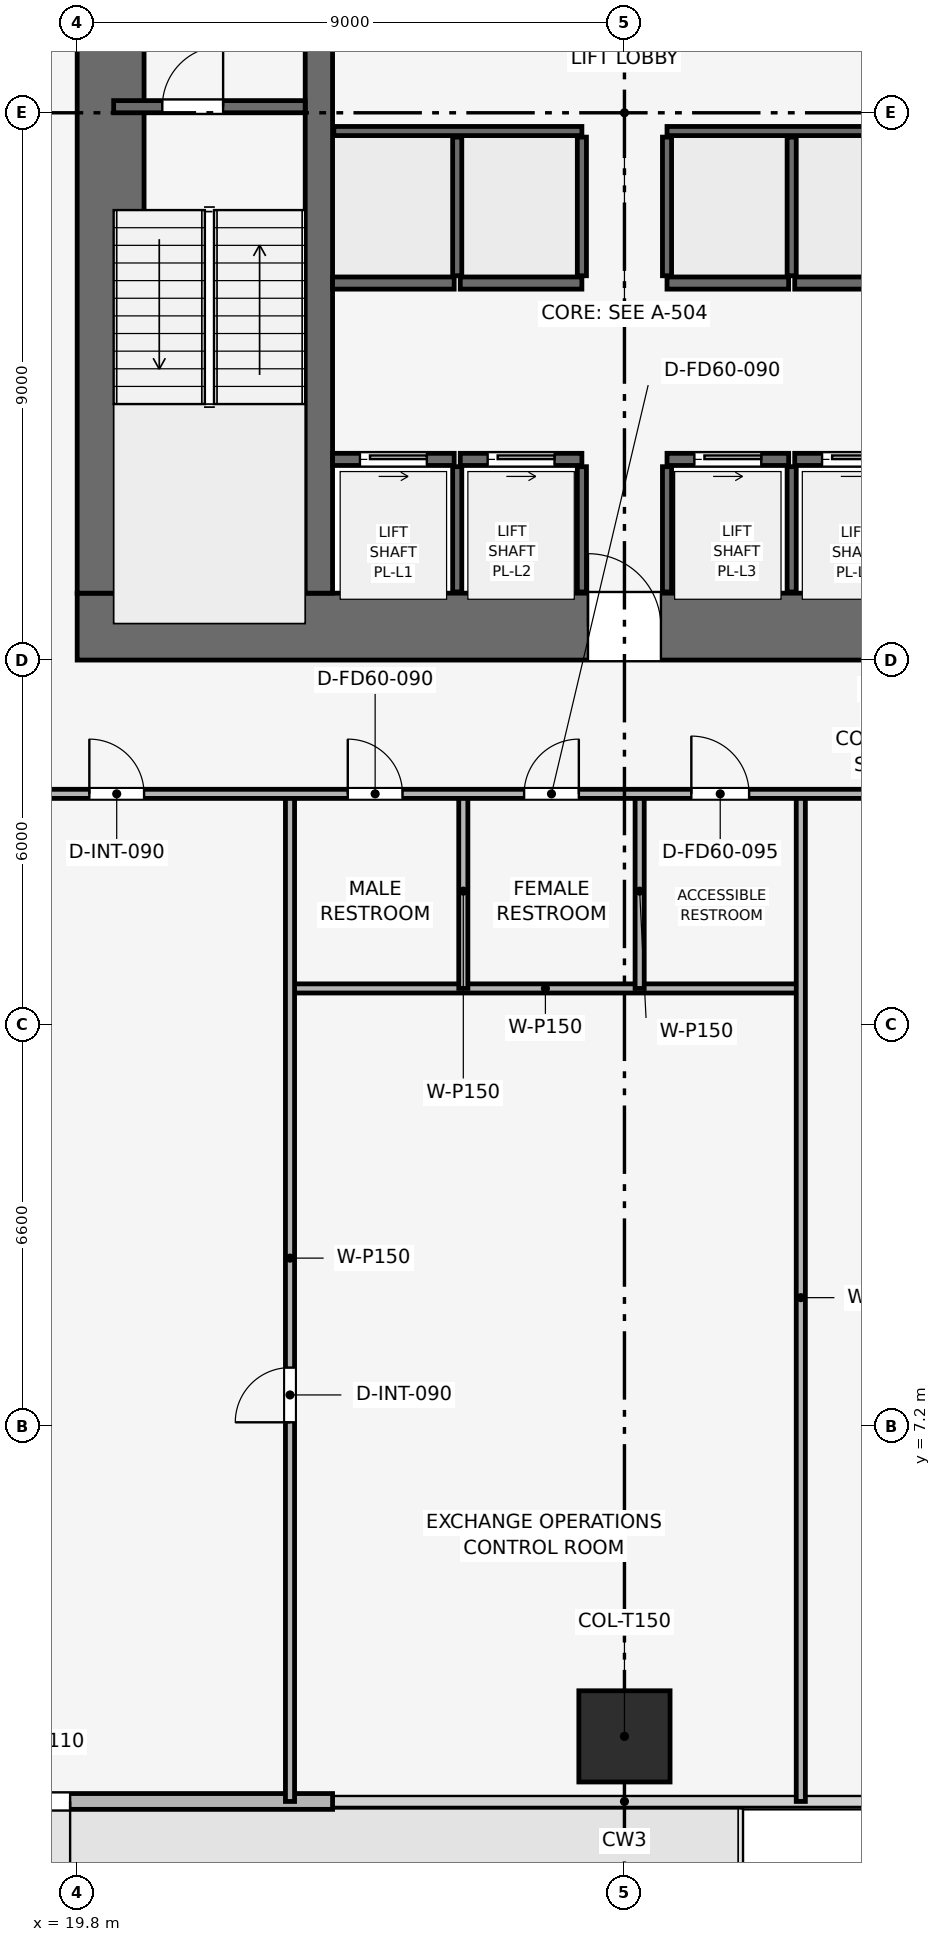
"""IFC4 building model, lengths in metres.
Left out: names, types, materials, properties, quantities, classifications, styles, units other than length and angle.
Written with IfcOpenShell. Run it as: python <this file> out.ifc"""

import sys

from ifc_helpers import new_model, si_unit, direction, frame, frame_2d, origin, origin_2d, place, context, subcontext, project, spatial, rectangle, extrude, element, fill, save


model = new_model("IFC4")
c1 = context("Model", 3, precision=1e-05, world=origin(), true_north=direction((0.0, 1.0)))
c2 = subcontext(c1, "Body", "Model", "MODEL_VIEW")
j1 = project(units=[si_unit("LENGTHUNIT", "METRE"), si_unit("PLANEANGLEUNIT", "RADIAN")], contexts=[c1])
p1 = place(None, origin())
s1 = spatial("IfcSite", under=j1, at=p1, CompositionType="ELEMENT")
p2 = place(p1, origin())
s2 = spatial("IfcBuilding", under=s1, at=p2, CompositionType="ELEMENT")
p3 = place(p2, frame((0.0, 0.0, 53.4)))
s3 = spatial("IfcBuildingStorey", under=s2, at=p3, CompositionType="ELEMENT", Elevation=53.4)
p4 = place(p3, frame((19.8, 20.35, 0.0), z_axis=(0.0, 0.0, 1.0), x_axis=(1.0, 0.0, 0.0)))
e1 = element("IfcWall", 1, at=p4, inside=s3, PredefinedType="SHEAR", context=c2, shape_type="SweptSolid", body=[
    extrude(rectangle(XDim=18.0, YDim=1.1, at=frame_2d((9.0, 0.0))), origin(), (0.0, 0.0, 1.0), 3.9),
])
p5 = place(p4, frame((8.4, 0.0, 0.0)))
e2 = element("IfcOpeningElement", 2, at=p5, cuts=e1, PredefinedType="OPENING", context=c2, shape_type="SweptSolid", body=[
    extrude(rectangle(XDim=1.2, YDim=2.2, at=frame_2d((0.6, 1.1))), frame((0.0, 0.56, 0.0), z_axis=(0.0, -1.0, 0.0), x_axis=(1.0, 0.0, 0.0)), (0.0, 0.0, 1.0), 1.12),
])
p6 = place(p3, frame((20.35, 20.9, 0.0), z_axis=(0.0, 0.0, 1.0), x_axis=(0.0, 1.0, 0.0)))
e3 = element("IfcWall", 3, at=p6, inside=s3, PredefinedType="SHEAR", context=c2, shape_type="SweptSolid", body=[
    extrude(rectangle(XDim=15.8, YDim=1.1, at=frame_2d((7.9, 0.0))), origin(), (0.0, 0.0, 1.0), 3.9),
])
p7 = place(p6, frame((9.9, 0.0, 0.0)))
e4 = element("IfcOpeningElement", 4, at=p7, cuts=e3, PredefinedType="OPENING", context=c2, shape_type="SweptSolid", body=[
    extrude(rectangle(XDim=1.1, YDim=2.15, at=frame_2d((0.55, 1.075))), frame((0.0, 0.56, 0.0), z_axis=(0.0, -1.0, 0.0), x_axis=(1.0, 0.0, 0.0)), (0.0, 0.0, 1.0), 1.12),
])
p8 = place(p3, frame((23.775, 20.9, 0.0), z_axis=(0.0, 0.0, 1.0), x_axis=(0.0, 1.0, 0.0)))
e5 = element("IfcWall", 5, at=p8, inside=s3, PredefinedType="SHEAR", context=c2, shape_type="SweptSolid", body=[
    extrude(rectangle(XDim=15.8, YDim=0.45, at=frame_2d((7.9, 0.0))), origin(), (0.0, 0.0, 1.0), 3.9),
])
p9 = place(p3, frame((28.8, 2.1, 0.003), z_axis=(0.0, 0.0, 1.0), x_axis=(1.0, 0.0, 0.0)))
e6 = element("IfcColumn", 6, at=p9, inside=s3, PredefinedType="COLUMN", context=c2, shape_type="SweptSolid", body=[
    extrude(rectangle(XDim=1.5, YDim=1.5, at=origin_2d()), origin(), (0.0, 0.0, 1.0), 3.644),
])
p10 = place(p3, frame((24.0, 1.03, 0.0), z_axis=(0.0, 0.0, 1.0), x_axis=(-1.0, 0.0, 0.0)))
e7 = element("IfcWall", 7, at=p10, inside=s3, PredefinedType="SOLIDWALL", context=c2, shape_type="SweptSolid", body=[
    extrude(rectangle(XDim=15.3, YDim=0.26, at=frame_2d((7.65, 0.0))), origin(), (0.0, 0.0, 1.0), 3.65),
])
p11 = place(p10, frame((4.316, 0.0, 0.0)))
e8 = element("IfcOpeningElement", 8, at=p11, cuts=e7, PredefinedType="OPENING", context=c2, shape_type="SweptSolid", body=[
    extrude(rectangle(XDim=1.1, YDim=2.2, at=frame_2d((0.55, 1.1))), frame((0.0, 0.14, 0.0), z_axis=(0.0, -1.0, 0.0), x_axis=(1.0, 0.0, 0.0)), (0.0, 0.0, 1.0), 0.28),
])
p12 = place(p3, frame((20.4, 28.9, 0.0), z_axis=(0.0, 0.0, 1.0), x_axis=(1.0, 0.0, 0.0)))
e9 = element("IfcWall", 9, at=p12, inside=s3, PredefinedType="SHEAR", context=c2, shape_type="SweptSolid", body=[
    extrude(rectangle(XDim=3.15, YDim=0.2, at=frame_2d((1.575, 0.0))), origin(), (0.0, 0.0, 1.0), 3.65),
])
p13 = place(p12, frame((0.8, 0.0, 0.0)))
e10 = element("IfcOpeningElement", 10, at=p13, cuts=e9, PredefinedType="OPENING", context=c2, shape_type="SweptSolid", body=[
    extrude(rectangle(XDim=1.0, YDim=2.1, at=frame_2d((0.5, 1.05))), frame((0.0, 0.11, 0.0), z_axis=(0.0, -1.0, 0.0), x_axis=(1.0, 0.0, 0.0)), (0.0, 0.0, 1.0), 0.22),
])
p14 = place(p3, frame((24.0, 23.1, 0.0), z_axis=(0.0, 0.0, 1.0), x_axis=(1.0, 0.0, 0.0)))
e11 = element("IfcWall", 11, at=p14, inside=s3, PredefinedType="SHEAR", context=c2, shape_type="SweptSolid", body=[
    extrude(rectangle(XDim=2.0, YDim=0.2, at=frame_2d((1.0, 0.0))), origin(), (0.0, 0.0, 1.0), 3.65),
])
p15 = place(p14, frame((0.45, 0.0, 0.0)))
e12 = element("IfcOpeningElement", 12, at=p15, cuts=e11, PredefinedType="OPENING", context=c2, shape_type="SweptSolid", body=[
    extrude(rectangle(XDim=1.1, YDim=2.15, at=frame_2d((0.55, 1.075))), frame((0.0, 0.11, 0.0), z_axis=(0.0, -1.0, 0.0), x_axis=(1.0, 0.0, 0.0)), (0.0, 0.0, 1.0), 0.22),
])
p16 = place(p3, frame((26.1, 23.1, 0.0), z_axis=(0.0, 0.0, 1.0), x_axis=(1.0, 0.0, 0.0)))
e13 = element("IfcWall", 13, at=p16, inside=s3, PredefinedType="SHEAR", context=c2, shape_type="SweptSolid", body=[
    extrude(rectangle(XDim=2.0, YDim=0.2, at=frame_2d((1.0, 0.0))), origin(), (0.0, 0.0, 1.0), 3.65),
])
p17 = place(p16, frame((0.45, 0.0, 0.0)))
e14 = element("IfcOpeningElement", 14, at=p17, cuts=e13, PredefinedType="OPENING", context=c2, shape_type="SweptSolid", body=[
    extrude(rectangle(XDim=1.1, YDim=2.15, at=frame_2d((0.55, 1.075))), frame((0.0, 0.11, 0.0), z_axis=(0.0, -1.0, 0.0), x_axis=(1.0, 0.0, 0.0)), (0.0, 0.0, 1.0), 0.22),
])
p18 = place(p3, frame((29.5, 23.1, 0.0), z_axis=(0.0, 0.0, 1.0), x_axis=(1.0, 0.0, 0.0)))
e15 = element("IfcWall", 15, at=p18, inside=s3, PredefinedType="SHEAR", context=c2, shape_type="SweptSolid", body=[
    extrude(rectangle(XDim=2.0, YDim=0.2, at=frame_2d((1.0, 0.0))), origin(), (0.0, 0.0, 1.0), 3.65),
])
p19 = place(p18, frame((0.45, 0.0, 0.0)))
e16 = element("IfcOpeningElement", 16, at=p19, cuts=e15, PredefinedType="OPENING", context=c2, shape_type="SweptSolid", body=[
    extrude(rectangle(XDim=1.1, YDim=2.15, at=frame_2d((0.55, 1.075))), frame((0.0, 0.11, 0.0), z_axis=(0.0, -1.0, 0.0), x_axis=(1.0, 0.0, 0.0)), (0.0, 0.0, 1.0), 0.22),
])
p20 = place(p3, frame((31.6, 23.1, 0.0), z_axis=(0.0, 0.0, 1.0), x_axis=(1.0, 0.0, 0.0)))
e17 = element("IfcWall", 17, at=p20, inside=s3, PredefinedType="SHEAR", context=c2, shape_type="SweptSolid", body=[
    extrude(rectangle(XDim=2.0, YDim=0.2, at=frame_2d((1.0, 0.0))), origin(), (0.0, 0.0, 1.0), 3.65),
])
p21 = place(p20, frame((0.45, 0.0, 0.0)))
e18 = element("IfcOpeningElement", 18, at=p21, cuts=e17, PredefinedType="OPENING", context=c2, shape_type="SweptSolid", body=[
    extrude(rectangle(XDim=1.1, YDim=2.15, at=frame_2d((0.55, 1.075))), frame((0.0, 0.11, 0.0), z_axis=(0.0, -1.0, 0.0), x_axis=(1.0, 0.0, 0.0)), (0.0, 0.0, 1.0), 0.22),
])
for number, where, z_axis, x_axis in (
    (19, (24.0, 26.0, 0.0), (0.0, 0.0, 1.0), (1.0, 0.0, 0.0)),
    (20, (26.1, 26.0, 0.0), (0.0, 0.0, 1.0), (1.0, 0.0, 0.0)),
    (21, (29.5, 26.0, 0.0), (0.0, 0.0, 1.0), (1.0, 0.0, 0.0)),
    (22, (31.6, 26.0, 0.0), (0.0, 0.0, 1.0), (1.0, 0.0, 0.0)),
):
    element("IfcWall", number, at=place(p3, frame(where, z_axis=z_axis, x_axis=x_axis)), inside=s3, PredefinedType="SHEAR", context=c2, shape_type="SweptSolid", body=[
        extrude(rectangle(XDim=2.0, YDim=0.2, at=frame_2d((1.0, 0.0))), origin(), (0.0, 0.0, 1.0), 3.65),
    ])
for number, where, z_axis, x_axis in (
    (23, (26.05, 20.92, 0.0), (0.0, 0.0, 1.0), (0.0, 1.0, 0.0)),
    (24, (28.1, 20.92, 0.0), (0.0, 0.0, 1.0), (0.0, 1.0, 0.0)),
    (25, (29.5, 20.92, 0.0), (0.0, 0.0, 1.0), (0.0, 1.0, 0.0)),
    (26, (31.55, 20.92, 0.0), (0.0, 0.0, 1.0), (0.0, 1.0, 0.0)),
):
    element("IfcWall", number, at=place(p3, frame(where, z_axis=z_axis, x_axis=x_axis)), inside=s3, PredefinedType="SHEAR", context=c2, shape_type="SweptSolid", body=[
        extrude(rectangle(XDim=2.06, YDim=0.15, at=frame_2d((1.03, 0.0))), origin(), (0.0, 0.0, 1.0), 3.65),
    ])
for number, where, z_axis, x_axis in (
    (27, (24.02, 28.5, 0.0), (0.0, 0.0, 1.0), (1.0, 0.0, 0.0)),
    (28, (29.5, 28.5, 0.0), (0.0, 0.0, 1.0), (1.0, 0.0, 0.0)),
):
    element("IfcWall", number, at=place(p3, frame(where, z_axis=z_axis, x_axis=x_axis)), inside=s3, PredefinedType="SHEAR", context=c2, shape_type="SweptSolid", body=[
        extrude(rectangle(XDim=4.08, YDim=0.15, at=frame_2d((2.04, 0.0))), origin(), (0.0, 0.0, 1.0), 3.65),
    ])
for number, where, z_axis, x_axis in (
    (29, (26.05, 26.12, 0.0), (0.0, 0.0, 1.0), (0.0, 1.0, 0.0)),
    (30, (28.1, 26.12, 0.0), (0.0, 0.0, 1.0), (0.0, 1.0, 0.0)),
    (31, (29.5, 26.12, 0.0), (0.0, 0.0, 1.0), (0.0, 1.0, 0.0)),
    (32, (31.55, 26.12, 0.0), (0.0, 0.0, 1.0), (0.0, 1.0, 0.0)),
):
    element("IfcWall", number, at=place(p3, frame(where, z_axis=z_axis, x_axis=x_axis)), inside=s3, PredefinedType="SHEAR", context=c2, shape_type="SweptSolid", body=[
        extrude(rectangle(XDim=2.28, YDim=0.15, at=frame_2d((1.14, 0.0))), origin(), (0.0, 0.0, 1.0), 3.65),
    ])
p22 = place(p3, frame((23.3, 14.4, 0.0), z_axis=(0.0, 0.0, 1.0), x_axis=(1.0, 0.0, 0.0)))
e33 = element("IfcWall", 33, at=p22, inside=s3, PredefinedType="PARTITIONING", context=c2, shape_type="SweptSolid", body=[
    extrude(rectangle(XDim=8.4, YDim=0.15, at=frame_2d((4.2, 0.0))), origin(), (0.0, 0.0, 1.0), 3.085),
])
p23 = place(p3, frame((23.3, 1.03, 0.0), z_axis=(0.0, 0.0, 1.0), x_axis=(0.0, 1.0, 0.0)))
e34 = element("IfcWall", 34, at=p23, inside=s3, PredefinedType="PARTITIONING", context=c2, shape_type="SweptSolid", body=[
    extrude(rectangle(XDim=16.57, YDim=0.15, at=frame_2d((8.285, 0.0))), origin(), (0.0, 0.0, 1.0), 2.935),
])
p24 = place(p23, frame((6.235, 0.0, 0.0)))
e35 = element("IfcOpeningElement", 35, at=p24, cuts=e34, PredefinedType="OPENING", context=c2, shape_type="SweptSolid", body=[
    extrude(rectangle(XDim=0.9, YDim=2.1, at=frame_2d((0.45, 1.05))), frame((0.0, 0.085, 0.0), z_axis=(0.0, -1.0, 0.0), x_axis=(1.0, 0.0, 0.0)), (0.0, 0.0, 1.0), 0.17),
])
p25 = place(p3, frame((31.7, 1.03, 0.0), z_axis=(0.0, 0.0, 1.0), x_axis=(0.0, 1.0, 0.0)))
e36 = element("IfcWall", 36, at=p25, inside=s3, PredefinedType="PARTITIONING", context=c2, shape_type="SweptSolid", body=[
    extrude(rectangle(XDim=16.57, YDim=0.15, at=frame_2d((8.285, 0.0))), origin(), (0.0, 0.0, 1.0), 2.935),
])
for number, where, z_axis, x_axis in (
    (37, (26.15, 14.4, 0.0), (0.0, 0.0, 1.0), (0.0, 1.0, 0.0)),
    (38, (29.05, 14.4, 0.0), (0.0, 0.0, 1.0), (0.0, 1.0, 0.0)),
):
    element("IfcWall", number, at=place(p3, frame(where, z_axis=z_axis, x_axis=x_axis)), inside=s3, PredefinedType="PARTITIONING", context=c2, shape_type="SweptSolid", body=[
        extrude(rectangle(XDim=3.2, YDim=0.15, at=frame_2d((1.6, 0.0))), origin(), (0.0, 0.0, 1.0), 3.65),
    ])
p26 = place(p3, frame((17.6, 17.6, 0.0), z_axis=(0.0, 0.0, 1.0), x_axis=(1.0, 0.0, 0.0)))
e39 = element("IfcWall", 39, at=p26, inside=s3, PredefinedType="PARTITIONING", context=c2, shape_type="SweptSolid", body=[
    extrude(rectangle(XDim=22.4, YDim=0.15, at=frame_2d((11.2, 0.0))), origin(), (0.0, 0.0, 1.0), 3.085),
])
p27 = place(p26, frame((2.4, 0.0, 0.0)))
e40 = element("IfcOpeningElement", 40, at=p27, cuts=e39, PredefinedType="OPENING", context=c2, shape_type="SweptSolid", body=[
    extrude(rectangle(XDim=0.9, YDim=2.1, at=frame_2d((0.45, 1.05))), frame((0.0, 0.085, 0.0), z_axis=(0.0, -1.0, 0.0), x_axis=(1.0, 0.0, 0.0)), (0.0, 0.0, 1.0), 0.17),
])
p28 = place(p26, frame((6.65, 0.0, 0.0)))
e41 = element("IfcOpeningElement", 41, at=p28, cuts=e39, PredefinedType="OPENING", context=c2, shape_type="SweptSolid", body=[
    extrude(rectangle(XDim=0.9, YDim=2.1, at=frame_2d((0.45, 1.05))), frame((0.0, 0.085, 0.0), z_axis=(0.0, -1.0, 0.0), x_axis=(1.0, 0.0, 0.0)), (0.0, 0.0, 1.0), 0.17),
])
p29 = place(p26, frame((9.55, 0.0, 0.0)))
e42 = element("IfcOpeningElement", 42, at=p29, cuts=e39, PredefinedType="OPENING", context=c2, shape_type="SweptSolid", body=[
    extrude(rectangle(XDim=0.9, YDim=2.1, at=frame_2d((0.45, 1.05))), frame((0.0, 0.085, 0.0), z_axis=(0.0, -1.0, 0.0), x_axis=(1.0, 0.0, 0.0)), (0.0, 0.0, 1.0), 0.17),
])
p30 = place(p26, frame((12.3, 0.0, 0.0)))
e43 = element("IfcOpeningElement", 43, at=p30, cuts=e39, PredefinedType="OPENING", context=c2, shape_type="SweptSolid", body=[
    extrude(rectangle(XDim=0.95, YDim=2.1, at=frame_2d((0.475, 1.05))), frame((0.0, 0.085, 0.0), z_axis=(0.0, -1.0, 0.0), x_axis=(1.0, 0.0, 0.0)), (0.0, 0.0, 1.0), 0.17),
])
p31 = place(p26, frame((17.8, 0.0, 0.0)))
e44 = element("IfcOpeningElement", 44, at=p31, cuts=e39, PredefinedType="OPENING", context=c2, shape_type="SweptSolid", body=[
    extrude(rectangle(XDim=0.9, YDim=2.1, at=frame_2d((0.45, 1.05))), frame((0.0, 0.085, 0.0), z_axis=(0.0, -1.0, 0.0), x_axis=(1.0, 0.0, 0.0)), (0.0, 0.0, 1.0), 0.17),
])
p32 = place(p11, origin())
e45 = element("IfcDoor", 45, at=p32, inside=s3, OperationType="SINGLE_SWING_LEFT", PredefinedType="DOOR", context=c2, shape_type="SweptSolid", body=[
    extrude(rectangle(XDim=1.1, YDim=2.2, at=frame_2d((0.55, 1.1))), frame((0.0, 0.025, 0.0), z_axis=(0.0, -1.0, 0.0), x_axis=(1.0, 0.0, 0.0)), (0.0, 0.0, 1.0), 0.05),
])
fill(e8, e45)
p33 = place(p13, origin())
e46 = element("IfcDoor", 46, at=p33, inside=s3, OperationType="SINGLE_SWING_RIGHT", PredefinedType="DOOR", context=c2, shape_type="SweptSolid", body=[
    extrude(rectangle(XDim=1.0, YDim=2.1, at=frame_2d((0.5, 1.05))), frame((0.0, 0.025, 0.0), z_axis=(0.0, -1.0, 0.0), x_axis=(1.0, 0.0, 0.0)), (0.0, 0.0, 1.0), 0.05),
])
fill(e10, e46)
p34 = place(p15, origin())
e47 = element("IfcDoor", 47, at=p34, inside=s3, OperationType="SLIDING_TO_RIGHT", PredefinedType="DOOR", context=c2, shape_type="SweptSolid", body=[
    extrude(rectangle(XDim=1.1, YDim=2.15, at=frame_2d((0.55, 1.075))), frame((0.0, 0.025, 0.0), z_axis=(0.0, -1.0, 0.0), x_axis=(1.0, 0.0, 0.0)), (0.0, 0.0, 1.0), 0.05),
])
fill(e12, e47)
p35 = place(p17, origin())
e48 = element("IfcDoor", 48, at=p35, inside=s3, OperationType="SLIDING_TO_RIGHT", PredefinedType="DOOR", context=c2, shape_type="SweptSolid", body=[
    extrude(rectangle(XDim=1.1, YDim=2.15, at=frame_2d((0.55, 1.075))), frame((0.0, 0.025, 0.0), z_axis=(0.0, -1.0, 0.0), x_axis=(1.0, 0.0, 0.0)), (0.0, 0.0, 1.0), 0.05),
])
fill(e14, e48)
p36 = place(p19, origin())
e49 = element("IfcDoor", 49, at=p36, inside=s3, OperationType="SLIDING_TO_RIGHT", PredefinedType="DOOR", context=c2, shape_type="SweptSolid", body=[
    extrude(rectangle(XDim=1.1, YDim=2.15, at=frame_2d((0.55, 1.075))), frame((0.0, 0.025, 0.0), z_axis=(0.0, -1.0, 0.0), x_axis=(1.0, 0.0, 0.0)), (0.0, 0.0, 1.0), 0.05),
])
fill(e16, e49)
p37 = place(p21, origin())
e50 = element("IfcDoor", 50, at=p37, inside=s3, OperationType="SLIDING_TO_RIGHT", PredefinedType="DOOR", context=c2, shape_type="SweptSolid", body=[
    extrude(rectangle(XDim=1.1, YDim=2.15, at=frame_2d((0.55, 1.075))), frame((0.0, 0.025, 0.0), z_axis=(0.0, -1.0, 0.0), x_axis=(1.0, 0.0, 0.0)), (0.0, 0.0, 1.0), 0.05),
])
fill(e18, e50)
p38 = place(p24, origin())
e51 = element("IfcDoor", 51, at=p38, inside=s3, OperationType="SINGLE_SWING_LEFT", PredefinedType="DOOR", context=c2, shape_type="SweptSolid", body=[
    extrude(rectangle(XDim=0.9, YDim=2.1, at=frame_2d((0.45, 1.05))), frame((0.0, 0.025, 0.0), z_axis=(0.0, -1.0, 0.0), x_axis=(1.0, 0.0, 0.0)), (0.0, 0.0, 1.0), 0.05),
])
fill(e35, e51)
p39 = place(p27, origin())
e52 = element("IfcDoor", 52, at=p39, inside=s3, OperationType="SINGLE_SWING_LEFT", PredefinedType="DOOR", context=c2, shape_type="SweptSolid", body=[
    extrude(rectangle(XDim=0.9, YDim=2.1, at=frame_2d((0.45, 1.05))), frame((0.0, 0.025, 0.0), z_axis=(0.0, -1.0, 0.0), x_axis=(1.0, 0.0, 0.0)), (0.0, 0.0, 1.0), 0.05),
])
fill(e40, e52)
p40 = place(p28, origin())
e53 = element("IfcDoor", 53, at=p40, inside=s3, OperationType="SINGLE_SWING_LEFT", PredefinedType="DOOR", context=c2, shape_type="SweptSolid", body=[
    extrude(rectangle(XDim=0.9, YDim=2.1, at=frame_2d((0.45, 1.05))), frame((0.0, 0.025, 0.0), z_axis=(0.0, -1.0, 0.0), x_axis=(1.0, 0.0, 0.0)), (0.0, 0.0, 1.0), 0.05),
])
fill(e41, e53)
p41 = place(p29, origin())
e54 = element("IfcDoor", 54, at=p41, inside=s3, OperationType="SINGLE_SWING_RIGHT", PredefinedType="DOOR", context=c2, shape_type="SweptSolid", body=[
    extrude(rectangle(XDim=0.9, YDim=2.1, at=frame_2d((0.45, 1.05))), frame((0.0, 0.025, 0.0), z_axis=(0.0, -1.0, 0.0), x_axis=(1.0, 0.0, 0.0)), (0.0, 0.0, 1.0), 0.05),
])
fill(e42, e54)
p42 = place(p30, origin())
e55 = element("IfcDoor", 55, at=p42, inside=s3, OperationType="SINGLE_SWING_LEFT", PredefinedType="DOOR", context=c2, shape_type="SweptSolid", body=[
    extrude(rectangle(XDim=0.95, YDim=2.1, at=frame_2d((0.475, 1.05))), frame((0.0, 0.025, 0.0), z_axis=(0.0, -1.0, 0.0), x_axis=(1.0, 0.0, 0.0)), (0.0, 0.0, 1.0), 0.05),
])
fill(e43, e55)
p43 = place(p5, origin())
e56 = element("IfcDoor", 56, at=p43, inside=s3, OperationType="SINGLE_SWING_LEFT", PredefinedType="DOOR", context=c2, shape_type="SweptSolid", body=[
    extrude(rectangle(XDim=1.2, YDim=2.2, at=frame_2d((0.6, 1.1))), frame((0.0, 0.025, 0.0), z_axis=(0.0, -1.0, 0.0), x_axis=(1.0, 0.0, 0.0)), (0.0, 0.0, 1.0), 0.05),
])
fill(e2, e56)
save(model, sys.argv[1])
